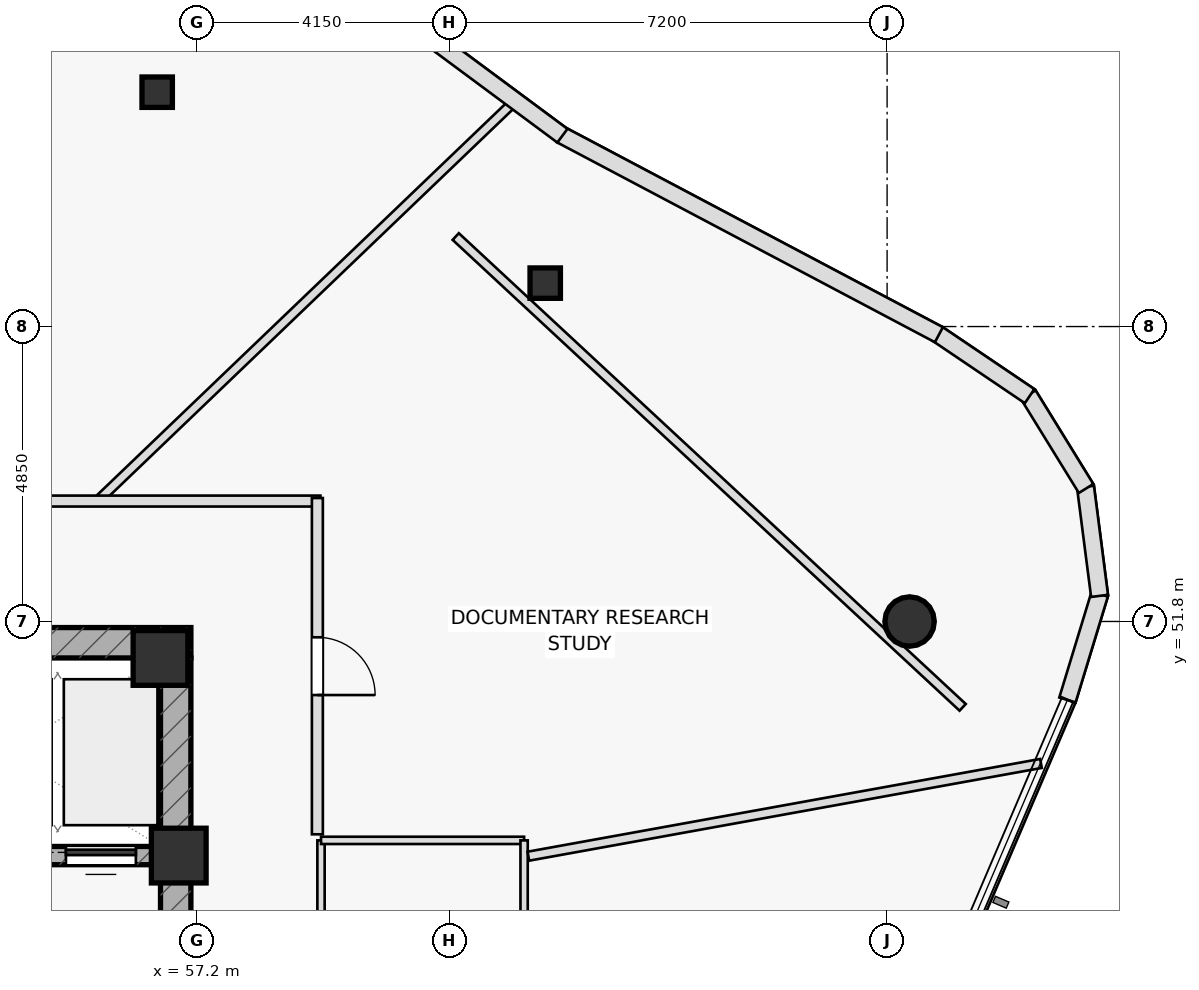
"""IFC4 building model, lengths in metres.
Left out: names, types, materials, properties, quantities, classifications, styles, units other than length and angle.
Written with IfcOpenShell. Run it as: python <this file> out.ifc"""

import sys

from ifc_helpers import new_model, si_unit, direction, frame, frame_2d, origin, origin_2d, place, context, subcontext, project, spatial, rectangle, hollow_rectangle, hollow_circle, extrude, element, fill, save


model = new_model("IFC4")
c1 = context("Model", 3, precision=1e-05, world=origin(), true_north=direction((0.0, 1.0)))
c2 = subcontext(c1, "Body", "Model", "MODEL_VIEW")
j1 = project(units=[si_unit("LENGTHUNIT", "METRE"), si_unit("PLANEANGLEUNIT", "RADIAN")], contexts=[c1])
p1 = place(None, origin())
s1 = spatial("IfcSite", under=j1, at=p1, CompositionType="ELEMENT")
p2 = place(p1, origin())
s2 = spatial("IfcBuilding", under=s1, at=p2, CompositionType="ELEMENT")
p3 = place(p2, frame((0.0, 0.0, 249.8)))
s3 = spatial("IfcBuildingStorey", under=s2, at=p3, CompositionType="ELEMENT", Elevation=249.8)
p4 = place(p3, frame((42.9, 51.45, 0.0), z_axis=(0.0, 0.0, 1.0), x_axis=(1.0, 0.0, 0.0)))
e1 = element("IfcWall", 1, at=p4, inside=s3, PredefinedType="SHEAR", context=c2, shape_type="SweptSolid", body=[
    extrude(rectangle(XDim=14.2, YDim=0.5, at=frame_2d((7.1, 0.0))), origin(), (0.0, 0.0, 1.0), 3.65),
])
p5 = place(p4, frame((0.78, 0.0, 0.0)))
e2 = element("IfcOpeningElement", 2, at=p5, cuts=e1, PredefinedType="OPENING", context=c2, shape_type="SweptSolid", body=[
    extrude(rectangle(XDim=1.05, YDim=2.2, at=frame_2d((0.525, 1.1))), frame((0.0, 0.26, 0.0), z_axis=(0.0, -1.0, 0.0), x_axis=(1.0, 0.0, 0.0)), (0.0, 0.0, 1.0), 0.52),
])
p6 = place(p3, frame((56.85, 38.8, 0.0), z_axis=(0.0, 0.0, 1.0), x_axis=(0.0, 1.0, 0.0)))
e3 = element("IfcWall", 3, at=p6, inside=s3, PredefinedType="SHEAR", context=c2, shape_type="SweptSolid", body=[
    extrude(rectangle(XDim=12.4, YDim=0.5, at=frame_2d((6.2, 0.0))), origin(), (0.0, 0.0, 1.0), 3.65),
])
p7 = place(p6, frame((3.85, 0.0, 0.0)))
e4 = element("IfcOpeningElement", 4, at=p7, cuts=e3, PredefinedType="OPENING", context=c2, shape_type="SweptSolid", body=[
    extrude(rectangle(XDim=1.5, YDim=2.2, at=frame_2d((0.75, 1.1))), frame((0.0, 0.26, 0.0), z_axis=(0.0, -1.0, 0.0), x_axis=(1.0, 0.0, 0.0)), (0.0, 0.0, 1.0), 0.52),
])
p8 = place(p3, frame((43.4, 47.95, 0.0), z_axis=(0.0, 0.0, 1.0), x_axis=(1.0, 0.0, 0.0)))
e5 = element("IfcWall", 5, at=p8, inside=s3, PredefinedType="SHEAR", context=c2, shape_type="SweptSolid", body=[
    extrude(rectangle(XDim=13.2, YDim=0.3, at=frame_2d((6.6, 0.0))), origin(), (0.0, 0.0, 1.0), 3.65),
])
p9 = place(p8, frame((8.345, 0.0, 0.0)))
e6 = element("IfcOpeningElement", 6, at=p9, cuts=e5, PredefinedType="OPENING", context=c2, shape_type="SweptSolid", body=[
    extrude(rectangle(XDim=1.15, YDim=2.2, at=frame_2d((0.575, 1.1))), frame((0.0, 0.16, 0.0), z_axis=(0.0, -1.0, 0.0), x_axis=(1.0, 0.0, 0.0)), (0.0, 0.0, 1.0), 0.32),
])
p10 = place(p8, frame((10.065, 0.0, 0.0)))
e7 = element("IfcOpeningElement", 7, at=p10, cuts=e5, PredefinedType="OPENING", context=c2, shape_type="SweptSolid", body=[
    extrude(rectangle(XDim=1.15, YDim=2.2, at=frame_2d((0.575, 1.1))), frame((0.0, 0.16, 0.0), z_axis=(0.0, -1.0, 0.0), x_axis=(1.0, 0.0, 0.0)), (0.0, 0.0, 1.0), 0.32),
])
p11 = place(p8, frame((11.645, 0.0, 0.0)))
e8 = element("IfcOpeningElement", 8, at=p11, cuts=e5, PredefinedType="OPENING", context=c2, shape_type="SweptSolid", body=[
    extrude(rectangle(XDim=1.15, YDim=2.2, at=frame_2d((0.575, 1.1))), frame((0.0, 0.16, 0.0), z_axis=(0.0, -1.0, 0.0), x_axis=(1.0, 0.0, 0.0)), (0.0, 0.0, 1.0), 0.32),
])
for number, where, z_axis, x_axis in (
    (9, (56.9, 47.95, 0.0), (0.0, 0.0, 1.0), (1.0, 0.0, 0.0)),
    (10, (56.6, 51.2, 0.0), (0.0, 0.0, 1.0), (1.0, 0.0, 0.0)),
):
    element("IfcColumn", number, at=place(p3, frame(where, z_axis=z_axis, x_axis=x_axis)), inside=s3, PredefinedType="COLUMN", context=c2, shape_type="SweptSolid", body=[
        extrude(rectangle(XDim=0.9, YDim=0.9, at=origin_2d()), origin(), (0.0, 0.0, 1.0), 3.65),
    ])
p12 = place(p3, frame((68.92, 51.799, 0.0), z_axis=(0.0, 0.0, 1.0), x_axis=(1.0, 0.0, 0.0)))
e11 = element("IfcColumn", 11, at=p12, inside=s3, PredefinedType="COLUMN", context=c2, shape_type="SweptSolid", body=[
    extrude(hollow_circle(Radius=0.406, WallThickness=0.036, at=origin_2d()), origin(), (0.0, 0.0, 1.0), 3.65),
])
for number, where, z_axis, x_axis in (
    (12, (62.927, 57.364, 0.0), (0.0, 0.0, 1.0), (1.0, 0.0, 0.0)),
    (13, (56.546, 60.504, 0.0), (0.0, 0.0, 1.0), (1.0, 0.0, 0.0)),
):
    element("IfcColumn", number, at=place(p3, frame(where, z_axis=z_axis, x_axis=x_axis)), inside=s3, PredefinedType="COLUMN", context=c2, shape_type="SweptSolid", body=[
        extrude(hollow_rectangle(XDim=0.5, YDim=0.5, WallThickness=0.03, at=origin_2d()), origin(), (0.0, 0.0, 1.0), 3.65),
    ])
p13 = place(p3, frame((69.792, 50.388, 0.0), z_axis=(0.0, 0.0, 1.0), x_axis=(-0.732769799181, 0.680476613418, 0.0)))
e14 = element("IfcWall", 14, at=p13, inside=s3, PredefinedType="PARTITIONING", context=c2, shape_type="SweptSolid", body=[
    extrude(rectangle(XDim=11.378, YDim=0.15, at=frame_2d((5.689, 0.0))), origin(), (0.0, 0.0, 1.0), 3.075),
])
p14 = place(p3, frame((59.24, 41.2, 0.0), z_axis=(0.0, 0.0, 1.0), x_axis=(0.0, 1.0, 0.0)))
e15 = element("IfcWall", 15, at=p14, inside=s3, PredefinedType="PARTITIONING", context=c2, shape_type="SweptSolid", body=[
    extrude(rectangle(XDim=7.0, YDim=0.12, at=frame_2d((3.5, 0.0))), origin(), (0.0, 0.0, 1.0), 3.65),
])
p15 = place(p14, frame((1.15, 0.0, 0.0)))
e16 = element("IfcOpeningElement", 16, at=p15, cuts=e15, PredefinedType="OPENING", context=c2, shape_type="SweptSolid", body=[
    extrude(rectangle(XDim=0.9, YDim=2.05, at=frame_2d((0.45, 1.025))), frame((0.0, 0.07, 0.0), z_axis=(0.0, -1.0, 0.0), x_axis=(1.0, 0.0, 0.0)), (0.0, 0.0, 1.0), 0.14),
])
p16 = place(p14, frame((4.7, 0.0, 0.0)))
e17 = element("IfcOpeningElement", 17, at=p16, cuts=e15, PredefinedType="OPENING", context=c2, shape_type="SweptSolid", body=[
    extrude(rectangle(XDim=0.9, YDim=2.05, at=frame_2d((0.45, 1.025))), frame((0.0, 0.07, 0.0), z_axis=(0.0, -1.0, 0.0), x_axis=(1.0, 0.0, 0.0)), (0.0, 0.0, 1.0), 0.14),
])
p17 = place(p3, frame((59.24, 48.2, 0.0), z_axis=(0.0, 0.0, 1.0), x_axis=(1.0, 0.0, 0.0)))
e18 = element("IfcWall", 18, at=p17, inside=s3, PredefinedType="PARTITIONING", context=c2, shape_type="SweptSolid", body=[
    extrude(rectangle(XDim=3.34, YDim=0.12, at=frame_2d((1.67, 0.0))), origin(), (0.0, 0.0, 1.0), 3.65),
])
p18 = place(p3, frame((62.58, 41.2, 0.0), z_axis=(0.0, 0.0, 1.0), x_axis=(0.0, 1.0, 0.0)))
e19 = element("IfcWall", 19, at=p18, inside=s3, PredefinedType="PARTITIONING", context=c2, shape_type="SweptSolid", body=[
    extrude(rectangle(XDim=7.0, YDim=0.12, at=frame_2d((3.5, 0.0))), origin(), (0.0, 0.0, 1.0), 3.355),
])
p19 = place(p3, frame((62.65, 47.94, 0.0), z_axis=(0.0, 0.0, 1.0), x_axis=(0.984027735719, 0.178015210965, 0.0)))
e20 = element("IfcWall", 20, at=p19, inside=s3, PredefinedType="PARTITIONING", context=c2, shape_type="SweptSolid", body=[
    extrude(rectangle(XDim=8.568, YDim=0.15, at=frame_2d((4.284, 0.0))), origin(), (0.0, 0.0, 1.0), 3.175),
])
p20 = place(p3, frame((55.563, 53.78, 0.0), z_axis=(0.0, 0.0, 1.0), x_axis=(0.722041014637, 0.691850253438, 0.0)))
e21 = element("IfcWall", 21, at=p20, inside=s3, PredefinedType="PARTITIONING", context=c2, shape_type="SweptSolid", body=[
    extrude(rectangle(XDim=9.526, YDim=0.15, at=frame_2d((4.763, 0.0))), origin(), (0.0, 0.0, 1.0), 3.075),
])
p21 = place(p3, frame((54.3, 53.78, 0.0), z_axis=(0.0, 0.0, 1.0), x_axis=(1.0, 0.0, 0.0)))
e22 = element("IfcWall", 22, at=p21, inside=s3, PredefinedType="PARTITIONING", context=c2, shape_type="SweptSolid", body=[
    extrude(rectangle(XDim=4.93, YDim=0.18, at=frame_2d((2.465, 0.0))), origin(), (0.0, 0.0, 1.0), 3.65),
])
p22 = place(p3, frame((59.18, 53.83, 0.0), z_axis=(0.0, 0.0, 1.0), x_axis=(0.0, -1.0, 0.0)))
e23 = element("IfcWall", 23, at=p22, inside=s3, PredefinedType="PARTITIONING", context=c2, shape_type="SweptSolid", body=[
    extrude(rectangle(XDim=5.53, YDim=0.18, at=frame_2d((2.765, 0.0))), origin(), (0.0, 0.0, 1.0), 3.65),
])
p23 = place(p22, frame((2.29, 0.0, 0.0)))
e24 = element("IfcOpeningElement", 24, at=p23, cuts=e23, PredefinedType="OPENING", context=c2, shape_type="SweptSolid", body=[
    extrude(rectangle(XDim=0.95, YDim=2.05, at=frame_2d((0.475, 1.025))), frame((0.0, 0.1, 0.0), z_axis=(0.0, -1.0, 0.0), x_axis=(1.0, 0.0, 0.0)), (0.0, 0.0, 1.0), 0.2),
])
p24 = place(p3, frame((71.516, 50.509, 0.0), z_axis=(0.0, 0.0, 1.0), x_axis=(0.29141775721, 0.956595886873, 0.0)))
e25 = element("IfcWall", 25, at=p24, inside=s3, PredefinedType="STANDARD", context=c2, shape_type="SweptSolid", body=[
    extrude(rectangle(XDim=1.821, YDim=0.28, at=frame_2d((0.91, 0.0))), origin(), (0.0, 0.0, 1.0), 3.65),
])
p25 = place(p3, frame((72.044, 52.221, 0.0), z_axis=(0.0, 0.0, 1.0), x_axis=(-0.12795420698, 0.99178007689, 0.0)))
e26 = element("IfcWall", 26, at=p25, inside=s3, PredefinedType="STANDARD", context=c2, shape_type="SweptSolid", body=[
    extrude(rectangle(XDim=1.809, YDim=0.28, at=frame_2d((0.904, 0.0))), origin(), (0.0, 0.0, 1.0), 3.65),
])
p26 = place(p3, frame((71.823, 53.987, 0.0), z_axis=(0.0, 0.0, 1.0), x_axis=(-0.524820244613, 0.851213081927, 0.0)))
e27 = element("IfcWall", 27, at=p26, inside=s3, PredefinedType="STANDARD", context=c2, shape_type="SweptSolid", body=[
    extrude(rectangle(XDim=1.809, YDim=0.28, at=frame_2d((0.904, 0.0))), origin(), (0.0, 0.0, 1.0), 3.65),
])
p27 = place(p3, frame((70.894, 55.506, 0.0), z_axis=(0.0, 0.0, 1.0), x_axis=(-0.828547180367, 0.559919253023, 0.0)))
e28 = element("IfcWall", 28, at=p27, inside=s3, PredefinedType="STANDARD", context=c2, shape_type="SweptSolid", body=[
    extrude(rectangle(XDim=1.831, YDim=0.28, at=frame_2d((0.916, 0.0))), origin(), (0.0, 0.0, 1.0), 3.65),
])
p28 = place(p3, frame((69.402, 56.516, 0.0), z_axis=(0.0, 0.0, 1.0), x_axis=(-0.883952511214, 0.46757668667, 0.0)))
e29 = element("IfcWall", 29, at=p28, inside=s3, PredefinedType="STANDARD", context=c2, shape_type="SweptSolid", body=[
    extrude(rectangle(XDim=7.033, YDim=0.28, at=frame_2d((3.517, 0.0))), origin(), (0.0, 0.0, 1.0), 3.65),
])
p29 = place(p3, frame((63.21, 59.788, 0.0), z_axis=(0.0, 0.0, 1.0), x_axis=(-0.803244511679, 0.595649439232, 0.0)))
e30 = element("IfcWall", 30, at=p29, inside=s3, PredefinedType="STANDARD", context=c2, shape_type="SweptSolid", body=[
    extrude(rectangle(XDim=7.666, YDim=0.28, at=frame_2d((3.833, 0.0))), origin(), (0.0, 0.0, 1.0), 3.65),
])
p30 = place(p23, origin())
e31 = element("IfcDoor", 31, at=p30, inside=s3, OperationType="SINGLE_SWING_RIGHT", PredefinedType="DOOR", context=c2, shape_type="SweptSolid", body=[
    extrude(rectangle(XDim=0.95, YDim=2.05, at=frame_2d((0.475, 1.025))), frame((0.0, 0.025, 0.0), z_axis=(0.0, -1.0, 0.0), x_axis=(1.0, 0.0, 0.0)), (0.0, 0.0, 1.0), 0.05),
])
fill(e24, e31)
p31 = place(p11, origin())
e32 = element("IfcDoor", 32, at=p31, inside=s3, OperationType="SLIDING_TO_LEFT", PredefinedType="DOOR", context=c2, shape_type="SweptSolid", body=[
    extrude(rectangle(XDim=1.15, YDim=2.2, at=frame_2d((0.575, 1.1))), frame((0.0, 0.025, 0.0), z_axis=(0.0, -1.0, 0.0), x_axis=(1.0, 0.0, 0.0)), (0.0, 0.0, 1.0), 0.05),
])
fill(e8, e32)
save(model, sys.argv[1])
